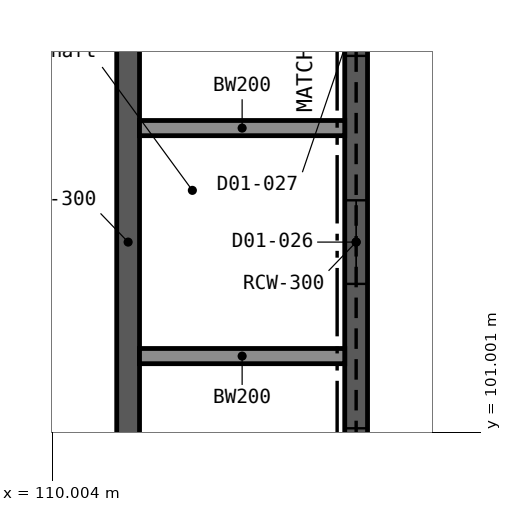
"""IFC4 building model, lengths in metres.
Left out: names, types, materials, properties, quantities, classifications, styles, units other than length and angle.
Written with IfcOpenShell. Run it as: python <this file> out.ifc"""

import sys

from ifc_helpers import new_model, si_unit, direction, frame, frame_2d, origin, place, context, subcontext, project, spatial, rectangle, extrude, element, fill, save


model = new_model("IFC4")
c1 = context("Model", 3, precision=1e-05, world=origin(), true_north=direction((0.0, 1.0)))
c2 = subcontext(c1, "Body", "Model", "MODEL_VIEW")
j1 = project(units=[si_unit("LENGTHUNIT", "METRE"), si_unit("PLANEANGLEUNIT", "RADIAN")], contexts=[c1])
p1 = place(None, origin())
s1 = spatial("IfcSite", under=j1, at=p1, CompositionType="ELEMENT")
p2 = place(p1, origin())
s2 = spatial("IfcBuilding", under=s1, at=p2, CompositionType="ELEMENT")
p3 = place(p2, frame((0.0, 0.0, 5.4)))
s3 = spatial("IfcBuildingStorey", under=s2, at=p3, CompositionType="ELEMENT", Elevation=5.4)
p4 = place(p3, frame((111.0, 99.15, 0.0), z_axis=(0.0, 0.0, 1.0), x_axis=(0.0, 1.0, 0.0)))
e1 = element("IfcWall", 1, at=p4, inside=s3, PredefinedType="SHEAR", context=c2, shape_type="SweptSolid", body=[
    extrude(rectangle(XDim=8.7, YDim=0.3, at=frame_2d((4.35, 0.0))), origin(), (0.0, 0.0, 1.0), 5.4),
])
p5 = place(p3, frame((114.0, 99.15, 0.0), z_axis=(0.0, 0.0, 1.0), x_axis=(0.0, 1.0, 0.0)))
e2 = element("IfcWall", 2, at=p5, inside=s3, PredefinedType="SHEAR", context=c2, shape_type="SweptSolid", body=[
    extrude(rectangle(XDim=8.7, YDim=0.3, at=frame_2d((4.35, 0.0))), origin(), (0.0, 0.0, 1.0), 5.4),
])
p6 = place(p5, frame((0.8, 0.0, 0.0)))
e3 = element("IfcOpeningElement", 3, at=p6, cuts=e2, PredefinedType="OPENING", context=c2, shape_type="SweptSolid", body=[
    extrude(rectangle(XDim=1.1, YDim=2.1, at=frame_2d((0.55, 1.05))), frame((0.0, 0.161, 0.0), z_axis=(0.0, -1.0, 0.0), x_axis=(1.0, 0.0, 0.0)), (0.0, 0.0, 1.0), 0.322),
])
p7 = place(p5, frame((3.8, 0.0, 0.0)))
e4 = element("IfcOpeningElement", 4, at=p7, cuts=e2, PredefinedType="OPENING", context=c2, shape_type="SweptSolid", body=[
    extrude(rectangle(XDim=1.1, YDim=2.1, at=frame_2d((0.55, 1.05))), frame((0.0, 0.161, 0.0), z_axis=(0.0, -1.0, 0.0), x_axis=(1.0, 0.0, 0.0)), (0.0, 0.0, 1.0), 0.322),
])
p8 = place(p5, frame((6.8, 0.0, 0.0)))
e5 = element("IfcOpeningElement", 5, at=p8, cuts=e2, PredefinedType="OPENING", context=c2, shape_type="SweptSolid", body=[
    extrude(rectangle(XDim=1.1, YDim=2.1, at=frame_2d((0.55, 1.05))), frame((0.0, 0.161, 0.0), z_axis=(0.0, -1.0, 0.0), x_axis=(1.0, 0.0, 0.0)), (0.0, 0.0, 1.0), 0.322),
])
for number, where, z_axis, x_axis in (
    (6, (111.15, 102.0, 0.0), (0.0, 0.0, 1.0), (1.0, 0.0, 0.0)),
    (7, (111.15, 105.0, 0.0), (0.0, 0.0, 1.0), (1.0, 0.0, 0.0)),
):
    element("IfcWall", number, at=place(p3, frame(where, z_axis=z_axis, x_axis=x_axis)), inside=s3, PredefinedType="SOLIDWALL", context=c2, shape_type="SweptSolid", body=[
        extrude(rectangle(XDim=2.7, YDim=0.2, at=frame_2d((1.35, 0.0))), origin(), (0.0, 0.0, 1.0), 5.4),
    ])
p9 = place(p6, origin())
e8 = element("IfcDoor", 8, at=p9, inside=s3, OperationType="DOUBLE_DOOR_SLIDING", PredefinedType="DOOR", context=c2, shape_type="SweptSolid", body=[
    extrude(rectangle(XDim=1.1, YDim=2.1, at=frame_2d((0.55, 1.05))), frame((0.0, 0.025, 0.0), z_axis=(0.0, -1.0, 0.0), x_axis=(1.0, 0.0, 0.0)), (0.0, 0.0, 1.0), 0.05),
])
fill(e3, e8)
p10 = place(p7, origin())
e9 = element("IfcDoor", 9, at=p10, inside=s3, OperationType="DOUBLE_DOOR_SLIDING", PredefinedType="DOOR", context=c2, shape_type="SweptSolid", body=[
    extrude(rectangle(XDim=1.1, YDim=2.1, at=frame_2d((0.55, 1.05))), frame((0.0, 0.025, 0.0), z_axis=(0.0, -1.0, 0.0), x_axis=(1.0, 0.0, 0.0)), (0.0, 0.0, 1.0), 0.05),
])
fill(e4, e9)
p11 = place(p8, origin())
e10 = element("IfcDoor", 10, at=p11, inside=s3, OperationType="DOUBLE_DOOR_SLIDING", PredefinedType="DOOR", context=c2, shape_type="SweptSolid", body=[
    extrude(rectangle(XDim=1.1, YDim=2.1, at=frame_2d((0.55, 1.05))), frame((0.0, 0.025, 0.0), z_axis=(0.0, -1.0, 0.0), x_axis=(1.0, 0.0, 0.0)), (0.0, 0.0, 1.0), 0.05),
])
fill(e5, e10)
save(model, sys.argv[1])
